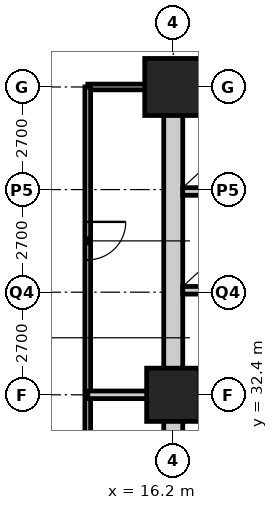
"""IFC4 building model, lengths in metres.
Left out: names, types, materials, properties, quantities, classifications, styles, units other than length and angle.
Written with IfcOpenShell. Run it as: python <this file> out.ifc"""

import sys

from ifc_helpers import new_model, si_unit, direction, frame, frame_2d, origin, origin_2d, place, context, subcontext, project, spatial, rectangle, hollow_rectangle, extrude, element, fill, save


model = new_model("IFC4")
c1 = context("Model", 3, precision=1e-05, world=origin(), true_north=direction((0.0, 1.0)))
c2 = subcontext(c1, "Body", "Model", "MODEL_VIEW")
j1 = project(units=[si_unit("LENGTHUNIT", "METRE"), si_unit("PLANEANGLEUNIT", "RADIAN")], contexts=[c1])
p1 = place(None, origin())
s1 = spatial("IfcSite", under=j1, at=p1, CompositionType="ELEMENT")
p2 = place(p1, origin())
s2 = spatial("IfcBuilding", under=s1, at=p2, CompositionType="ELEMENT")
p3 = place(p2, frame((0.0, 0.0, 84.0)))
s3 = spatial("IfcBuildingStorey", under=s2, at=p3, CompositionType="ELEMENT", Elevation=84.0)
p4 = place(p3, frame((16.2, 32.4, 0.0), z_axis=(0.0, 0.0, 1.0), x_axis=(1.0, 0.0, 0.0)))
e1 = element("IfcColumn", 1, at=p4, inside=s3, PredefinedType="COLUMN", context=c2, shape_type="SweptSolid", body=[
    extrude(hollow_rectangle(XDim=1.4, YDim=1.4, WallThickness=0.12, at=origin_2d()), origin(), (0.0, 0.0, 1.0), 3.4),
])
p5 = place(p3, frame((16.2, 40.5, 0.0), z_axis=(0.0, 0.0, 1.0), x_axis=(1.0, 0.0, 0.0)))
e2 = element("IfcColumn", 2, at=p5, inside=s3, PredefinedType="COLUMN", context=c2, shape_type="SweptSolid", body=[
    extrude(hollow_rectangle(XDim=1.5, YDim=1.5, WallThickness=0.13, at=origin_2d()), origin(), (0.0, 0.0, 1.0), 3.4),
])
p6 = place(p3, frame((16.0, 40.5, 0.0), z_axis=(0.0, 0.0, 1.0), x_axis=(-1.0, 0.0, 0.0)))
e3 = element("IfcWall", 3, at=p6, inside=s3, PredefinedType="PARTITIONING", context=c2, shape_type="SweptSolid", body=[
    extrude(rectangle(XDim=2.05, YDim=0.15, at=frame_2d((1.025, 0.0))), origin(), (0.0, 0.0, 1.0), 2.428),
])
p7 = place(p3, frame((13.95, 40.5, 0.0), z_axis=(0.0, 0.0, 1.0), x_axis=(0.0, -1.0, 0.0)))
e4 = element("IfcWall", 4, at=p7, inside=s3, PredefinedType="PARTITIONING", context=c2, shape_type="SweptSolid", body=[
    extrude(rectangle(XDim=22.5, YDim=0.15, at=frame_2d((11.25, 0.0))), origin(), (0.0, 0.0, 1.0), 3.19),
])
p8 = place(p7, frame((11.65, 0.0, 0.0)))
e5 = element("IfcOpeningElement", 5, at=p8, cuts=e4, PredefinedType="OPENING", context=c2, shape_type="SweptSolid", body=[
    extrude(rectangle(XDim=1.0, YDim=2.1, at=frame_2d((0.5, 1.05))), frame((0.0, 0.085, 0.0), z_axis=(0.0, -1.0, 0.0), x_axis=(1.0, 0.0, 0.0)), (0.0, 0.0, 1.0), 0.17),
])
p9 = place(p7, frame((3.55, 0.0, 0.0)))
e6 = element("IfcOpeningElement", 6, at=p9, cuts=e4, PredefinedType="OPENING", context=c2, shape_type="SweptSolid", body=[
    extrude(rectangle(XDim=1.0, YDim=2.1, at=frame_2d((0.5, 1.05))), frame((0.0, 0.085, 0.0), z_axis=(0.0, -1.0, 0.0), x_axis=(1.0, 0.0, 0.0)), (0.0, 0.0, 1.0), 0.17),
])
p10 = place(p3, frame((13.95, 32.4, 0.0), z_axis=(0.0, 0.0, 1.0), x_axis=(1.0, 0.0, 0.0)))
e7 = element("IfcWall", 7, at=p10, inside=s3, PredefinedType="SOLIDWALL", context=c2, shape_type="SweptSolid", body=[
    extrude(rectangle(XDim=2.25, YDim=0.2, at=frame_2d((1.125, 0.0))), origin(), (0.0, 0.0, 1.0), 2.428),
])
p11 = place(p3, frame((15.95, 40.5, 0.0), z_axis=(0.0, 0.0, 1.0), x_axis=(1.0, 0.0, 0.0)))
e8 = element("IfcWall", 8, at=p11, inside=s3, PredefinedType="SOLIDWALL", context=c2, shape_type="SweptSolid", body=[
    extrude(rectangle(XDim=24.8, YDim=0.5, at=frame_2d((12.4, 0.0))), origin(), (0.0, 0.0, 1.0), 2.428),
])
p12 = place(p11, frame((11.5, 0.0, 0.0)))
e9 = element("IfcOpeningElement", 9, at=p12, cuts=e8, PredefinedType="OPENING", context=c2, shape_type="SweptSolid", body=[
    extrude(rectangle(XDim=1.8, YDim=2.4, at=frame_2d((0.9, 1.2))), frame((0.0, 0.26, 0.0), z_axis=(0.0, -1.0, 0.0), x_axis=(1.0, 0.0, 0.0)), (0.0, 0.0, 1.0), 0.52),
])
p13 = place(p3, frame((16.2, 24.55, 0.0), z_axis=(0.0, 0.0, 1.0), x_axis=(0.0, 1.0, 0.0)))
e10 = element("IfcWall", 10, at=p13, inside=s3, PredefinedType="SOLIDWALL", context=c2, shape_type="SweptSolid", body=[
    extrude(rectangle(XDim=15.7, YDim=0.5, at=frame_2d((7.85, 0.0))), origin(), (0.0, 0.0, 1.0), 2.428),
])
p14 = place(p3, frame((16.45, 32.4, 0.0), z_axis=(0.0, 0.0, 1.0), x_axis=(1.0, 0.0, 0.0)))
e11 = element("IfcWall", 11, at=p14, inside=s3, PredefinedType="SOLIDWALL", context=c2, shape_type="SweptSolid", body=[
    extrude(rectangle(XDim=7.95, YDim=0.2, at=frame_2d((3.975, 0.0))), origin(), (0.0, 0.0, 1.0), 2.578),
])
for number, where, z_axis, x_axis in (
    (12, (16.45, 35.15, 0.0), (0.0, 0.0, 1.0), (1.0, 0.0, 0.0)),
    (13, (16.45, 37.75, 0.0), (0.0, 0.0, 1.0), (1.0, 0.0, 0.0)),
):
    element("IfcWall", number, at=place(p3, frame(where, z_axis=z_axis, x_axis=x_axis)), inside=s3, PredefinedType="SOLIDWALL", context=c2, shape_type="SweptSolid", body=[
        extrude(rectangle(XDim=2.6, YDim=0.2, at=frame_2d((1.3, 0.0))), origin(), (0.0, 0.0, 1.0), 3.19),
    ])
p15 = place(p9, origin())
e14 = element("IfcDoor", 14, at=p15, inside=s3, OperationType="SINGLE_SWING_LEFT", PredefinedType="DOOR", context=c2, shape_type="SweptSolid", body=[
    extrude(rectangle(XDim=1.0, YDim=2.1, at=frame_2d((0.5, 1.05))), frame((0.0, 0.025, 0.0), z_axis=(0.0, -1.0, 0.0), x_axis=(1.0, 0.0, 0.0)), (0.0, 0.0, 1.0), 0.05),
])
fill(e6, e14)
save(model, sys.argv[1])
